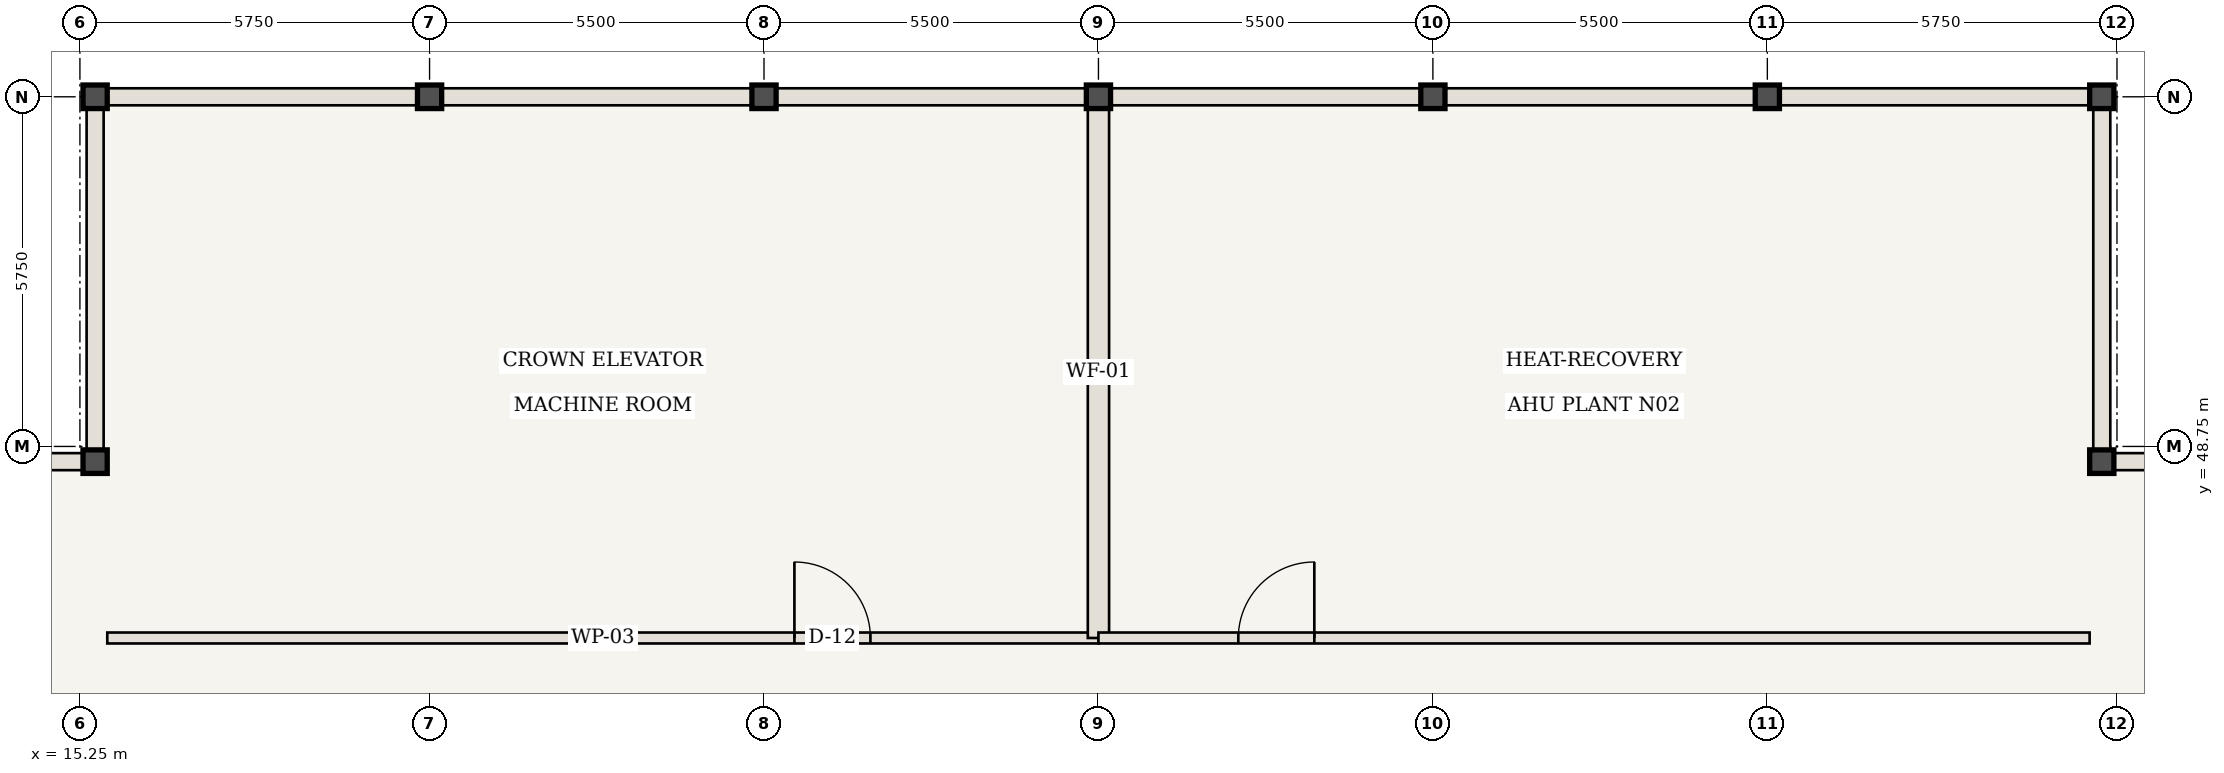
"""IFC4 building model, lengths in metres.
Left out: names, types, materials, properties, quantities, classifications, styles, units other than length and angle.
Written with IfcOpenShell. Run it as: python <this file> out.ifc"""

import sys

from ifc_helpers import new_model, si_unit, direction, frame, frame_2d, origin, origin_2d, place, context, subcontext, project, spatial, polyline, rectangle, i_section, outline, extrude, element, fill, save


model = new_model("IFC4")
c1 = context("Model", 3, precision=1e-05, world=origin(), true_north=direction((0.0, 1.0)))
c2 = subcontext(c1, "Body", "Model", "MODEL_VIEW")
j1 = project(units=[si_unit("LENGTHUNIT", "METRE"), si_unit("PLANEANGLEUNIT", "RADIAN")], contexts=[c1])
p1 = place(None, origin())
s1 = spatial("IfcSite", under=j1, at=p1, CompositionType="ELEMENT")
p2 = place(p1, origin())
s2 = spatial("IfcBuilding", under=s1, at=p2, CompositionType="ELEMENT")
p3 = place(p2, frame((0.0, 0.0, 331.45)))
s3 = spatial("IfcBuildingStorey", under=s2, at=p3, CompositionType="ELEMENT", Elevation=331.45)
p4 = place(p3, frame((48.5, 48.5, 0.0), z_axis=(0.0, 0.0, 1.0), x_axis=(1.0, 0.0, 0.0)))
e1 = element("IfcColumn", 1, at=p4, inside=s3, PredefinedType="COLUMN", context=c2, shape_type="SweptSolid", body=[
    extrude(i_section(OverallWidth=0.398, OverallDepth=0.387, WebThickness=0.021, FlangeThickness=0.033, at=origin_2d()), origin(), (0.0, 0.0, 1.0), 21.357),
])
for number, where, z_axis, x_axis in (
    (2, (48.5, 54.5, 0.0), (0.0, 0.0, 1.0), (1.0, 0.0, 0.0)),
    (3, (15.5, 54.5, 0.0), (0.0, 0.0, 1.0), (1.0, 0.0, 0.0)),
):
    element("IfcColumn", number, at=place(p3, frame(where, z_axis=z_axis, x_axis=x_axis)), inside=s3, PredefinedType="COLUMN", context=c2, shape_type="SweptSolid", body=[
        extrude(i_section(OverallWidth=0.398, OverallDepth=0.387, WebThickness=0.021, FlangeThickness=0.033, at=origin_2d()), origin(), (0.0, 0.0, 1.0), 24.29),
    ])
p5 = place(p3, frame((15.5, 48.5, 0.0), z_axis=(0.0, 0.0, 1.0), x_axis=(1.0, 0.0, 0.0)))
e4 = element("IfcColumn", 4, at=p5, inside=s3, PredefinedType="COLUMN", context=c2, shape_type="SweptSolid", body=[
    extrude(i_section(OverallWidth=0.398, OverallDepth=0.387, WebThickness=0.021, FlangeThickness=0.033, at=origin_2d()), origin(), (0.0, 0.0, 1.0), 21.357),
])
for number, where, z_axis, x_axis in (
    (5, (21.0, 54.5, 0.0), (0.0, 0.0, 1.0), (1.0, 0.0, 0.0)),
    (6, (26.5, 54.5, 0.0), (0.0, 0.0, 1.0), (1.0, 0.0, 0.0)),
    (7, (32.0, 54.5, 0.0), (0.0, 0.0, 1.0), (1.0, 0.0, 0.0)),
    (8, (37.5, 54.5, 0.0), (0.0, 0.0, 1.0), (1.0, 0.0, 0.0)),
    (9, (43.0, 54.5, 0.0), (0.0, 0.0, 1.0), (1.0, 0.0, 0.0)),
):
    element("IfcColumn", number, at=place(p3, frame(where, z_axis=z_axis, x_axis=x_axis)), inside=s3, PredefinedType="COLUMN", context=c2, shape_type="SweptSolid", body=[
        extrude(i_section(OverallWidth=0.398, OverallDepth=0.387, WebThickness=0.021, FlangeThickness=0.033, at=origin_2d()), origin(), (0.0, 0.0, 1.0), 24.29),
    ])
p6 = place(p3, frame((15.7, 45.6, 0.0), z_axis=(0.0, 0.0, 1.0), x_axis=(1.0, 0.0, 0.0)))
e10 = element("IfcWall", 10, at=p6, inside=s3, PredefinedType="STANDARD", context=c2, shape_type="SweptSolid", body=[
    extrude(rectangle(XDim=16.3, YDim=0.18, at=frame_2d((8.15, 0.0))), origin(), (0.0, 0.0, 1.0), 5.35),
])
p7 = place(p6, frame((11.3, 0.0, 0.0)))
e11 = element("IfcOpeningElement", 11, at=p7, cuts=e10, PredefinedType="OPENING", context=c2, shape_type="SweptSolid", body=[
    extrude(rectangle(XDim=1.25, YDim=2.2, at=frame_2d((0.625, 1.1))), frame((0.0, 0.1, 0.0), z_axis=(0.0, -1.0, 0.0), x_axis=(1.0, 0.0, 0.0)), (0.0, 0.0, 1.0), 0.2),
])
p8 = place(p3, frame((32.0, 45.6, 0.0), z_axis=(0.0, 0.0, 1.0), x_axis=(0.0, 1.0, 0.0)))
e12 = element("IfcWall", 12, at=p8, inside=s3, PredefinedType="STANDARD", context=c2, shape_type="SweptSolid", body=[
    extrude(rectangle(XDim=8.74, YDim=0.35, at=frame_2d((4.37, 0.0))), origin(), (0.0, 0.0, 1.0), 1.451),
])
p9 = place(p3, frame((32.0, 45.6, 0.0), z_axis=(0.0, 0.0, 1.0), x_axis=(1.0, 0.0, 0.0)))
e13 = element("IfcWall", 13, at=p9, inside=s3, PredefinedType="STANDARD", context=c2, shape_type="SweptSolid", body=[
    extrude(rectangle(XDim=16.3, YDim=0.18, at=frame_2d((8.15, 0.0))), origin(), (0.0, 0.0, 1.0), 5.35),
])
p10 = place(p9, frame((2.3, 0.0, 0.0)))
e14 = element("IfcOpeningElement", 14, at=p10, cuts=e13, PredefinedType="OPENING", context=c2, shape_type="SweptSolid", body=[
    extrude(rectangle(XDim=1.25, YDim=2.2, at=frame_2d((0.625, 1.1))), frame((0.0, 0.1, 0.0), z_axis=(0.0, -1.0, 0.0), x_axis=(1.0, 0.0, 0.0)), (0.0, 0.0, 1.0), 0.2),
])
for number, where, z_axis, x_axis in (
    (15, (15.5, 54.5, 0.0), (0.0, 0.0, 1.0), (1.0, 0.0, 0.0)),
    (16, (21.0, 54.5, 0.0), (0.0, 0.0, 1.0), (1.0, 0.0, 0.0)),
    (17, (26.5, 54.5, 0.0), (0.0, 0.0, 1.0), (1.0, 0.0, 0.0)),
    (18, (32.0, 54.5, 0.0), (0.0, 0.0, 1.0), (1.0, 0.0, 0.0)),
    (19, (37.5, 54.5, 0.0), (0.0, 0.0, 1.0), (1.0, 0.0, 0.0)),
    (20, (43.0, 54.5, 0.0), (0.0, 0.0, 1.0), (1.0, 0.0, 0.0)),
):
    element("IfcWall", number, at=place(p3, frame(where, z_axis=z_axis, x_axis=x_axis)), inside=s3, PredefinedType="USERDEFINED", context=c2, shape_type="SweptSolid", body=[
        extrude(rectangle(XDim=5.5, YDim=0.28, at=frame_2d((2.75, 0.0))), origin(), (0.0, 0.0, 1.0), 23.61),
    ])
p11 = place(p3, frame((48.5, 48.5, 0.0), z_axis=(0.0, 0.0, 1.0), x_axis=(1.0, 0.0, 0.0)))
e21 = element("IfcWall", 21, at=p11, inside=s3, PredefinedType="USERDEFINED", context=c2, shape_type="SweptSolid", body=[
    extrude(rectangle(XDim=6.0, YDim=0.28, at=frame_2d((3.0, 0.0))), origin(), (0.0, 0.0, 1.0), 20.677),
])
p12 = place(p3, frame((48.5, 54.5, 0.0), z_axis=(0.0, 0.0, 1.0), x_axis=(0.0, -1.0, 0.0)))
e22 = element("IfcWall", 22, at=p12, inside=s3, PredefinedType="USERDEFINED", context=c2, shape_type="SweptSolid", body=[
    extrude(outline(polyline([(0.0, 0.0), (6.0, 0.0), (6.0, 20.677), (0.0, 23.61), (0.0, 0.0)])), frame((0.0, 0.14, 0.0), z_axis=(0.0, -1.0, 0.0), x_axis=(1.0, 0.0, 0.0)), (0.0, 0.0, 1.0), 0.28),
])
p13 = place(p3, frame((15.5, 48.5, 0.0), z_axis=(0.0, 0.0, 1.0), x_axis=(0.0, 1.0, 0.0)))
e23 = element("IfcWall", 23, at=p13, inside=s3, PredefinedType="USERDEFINED", context=c2, shape_type="SweptSolid", body=[
    extrude(outline(polyline([(0.0, 0.0), (6.0, 0.0), (6.0, 23.61), (0.0, 20.677), (0.0, 0.0)])), frame((0.0, 0.14, 0.0), z_axis=(0.0, -1.0, 0.0), x_axis=(1.0, 0.0, 0.0)), (0.0, 0.0, 1.0), 0.28),
])
p14 = place(p3, frame((9.5, 48.5, 0.0), z_axis=(0.0, 0.0, 1.0), x_axis=(1.0, 0.0, 0.0)))
e24 = element("IfcWall", 24, at=p14, inside=s3, PredefinedType="USERDEFINED", context=c2, shape_type="SweptSolid", body=[
    extrude(rectangle(XDim=6.0, YDim=0.28, at=frame_2d((3.0, 0.0))), origin(), (0.0, 0.0, 1.0), 20.677),
])
p15 = place(p7, origin())
e25 = element("IfcDoor", 25, at=p15, inside=s3, OperationType="SINGLE_SWING_LEFT", PredefinedType="DOOR", context=c2, shape_type="SweptSolid", body=[
    extrude(rectangle(XDim=1.25, YDim=2.2, at=frame_2d((0.625, 1.1))), frame((0.0, 0.025, 0.0), z_axis=(0.0, -1.0, 0.0), x_axis=(1.0, 0.0, 0.0)), (0.0, 0.0, 1.0), 0.05),
])
fill(e11, e25)
p16 = place(p10, origin())
e26 = element("IfcDoor", 26, at=p16, inside=s3, OperationType="SINGLE_SWING_RIGHT", PredefinedType="DOOR", context=c2, shape_type="SweptSolid", body=[
    extrude(rectangle(XDim=1.25, YDim=2.2, at=frame_2d((0.625, 1.1))), frame((0.0, 0.025, 0.0), z_axis=(0.0, -1.0, 0.0), x_axis=(1.0, 0.0, 0.0)), (0.0, 0.0, 1.0), 0.05),
])
fill(e14, e26)
save(model, sys.argv[1])
